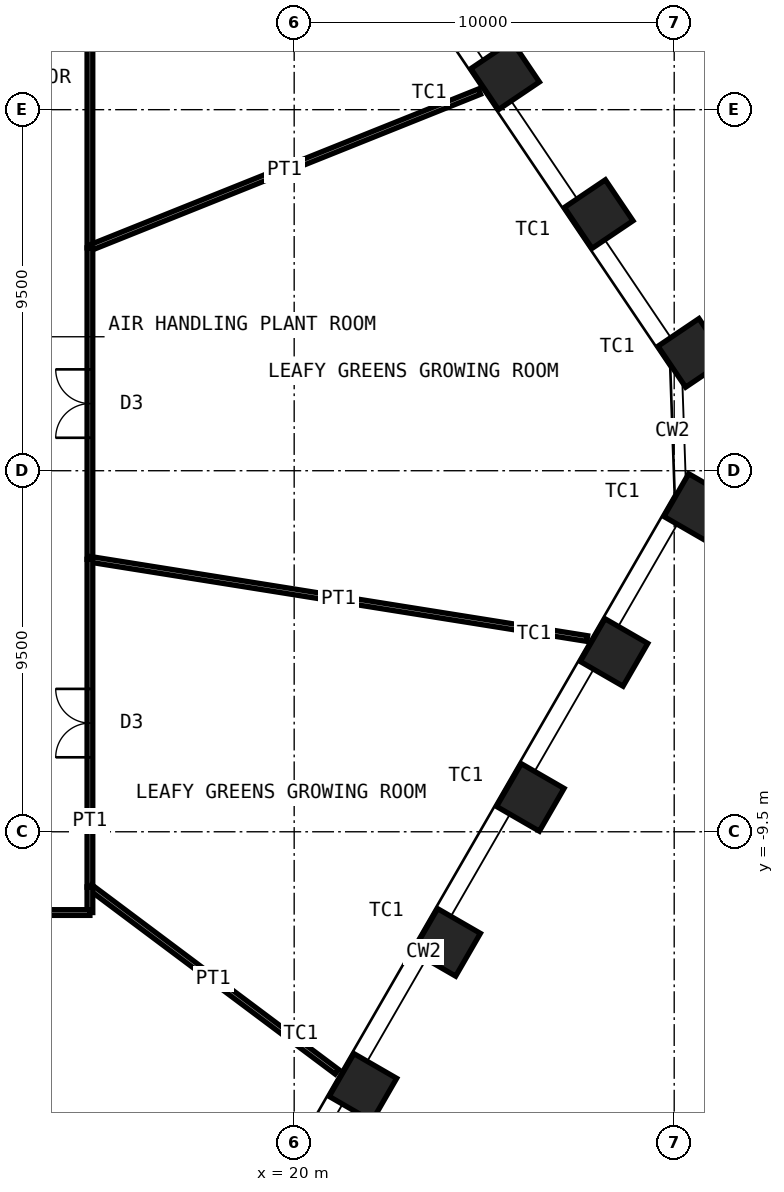
"""IFC4 building model, lengths in metres.
Left out: names, types, materials, properties, quantities, classifications, styles, units other than length and angle.
Written with IfcOpenShell. Run it as: python <this file> out.ifc"""

import sys

from ifc_helpers import new_model, si_unit, direction, frame, frame_2d, origin, origin_2d, place, context, subcontext, project, spatial, rectangle, hollow_rectangle, extrude, element, fill, save


model = new_model("IFC4")
c1 = context("Model", 3, precision=1e-05, world=origin(), true_north=direction((0.0, 1.0)))
c2 = subcontext(c1, "Body", "Model", "MODEL_VIEW")
j1 = project(units=[si_unit("LENGTHUNIT", "METRE"), si_unit("PLANEANGLEUNIT", "RADIAN")], contexts=[c1])
p1 = place(None, origin())
s1 = spatial("IfcSite", under=j1, at=p1, CompositionType="ELEMENT")
p2 = place(p1, origin())
s2 = spatial("IfcBuilding", under=s1, at=p2, CompositionType="ELEMENT")
p3 = place(p2, frame((0.0, 0.0, 47.0)))
s3 = spatial("IfcBuildingStorey", under=s2, at=p3, CompositionType="ELEMENT", Elevation=47.0)
for number, where, z_axis, x_axis in (
    (1, (25.55, 10.404, 0.0), (0.0, 0.0, 1.0), (-0.559, 0.829, 0.0)),
    (2, (28.013, 6.752, 0.0), (0.0, 0.0, 1.0), (-0.559, 0.829, 0.0)),
    (3, (30.476, 3.101, 0.0), (0.0, 0.0, 1.0), (-0.559, 0.829, 0.0)),
    (4, (30.618, -0.967, 0.0), (0.0, 0.0, 1.0), (0.5, 0.866, 0.0)),
    (5, (28.416, -4.782, 0.0), (0.0, 0.0, 1.0), (0.5, 0.866, 0.0)),
    (6, (26.214, -8.596, 0.0), (0.0, 0.0, 1.0), (0.5, 0.866, 0.0)),
    (7, (24.011, -12.411, 0.0), (0.0, 0.0, 1.0), (0.5, 0.866, 0.0)),
    (8, (21.809, -16.225, 0.0), (0.0, 0.0, 1.0), (0.5, 0.866, 0.0)),
):
    element("IfcColumn", number, at=place(p3, frame(where, z_axis=z_axis, x_axis=x_axis)), inside=s3, PredefinedType="COLUMN", context=c2, shape_type="SweptSolid", body=[
        extrude(hollow_rectangle(XDim=1.3, YDim=1.3, WallThickness=0.1, at=origin_2d()), origin(), (0.0, 0.0, 1.0), 5.0),
    ])
p4 = place(p3, frame((14.625, 11.625, 0.0), z_axis=(0.0, 0.0, 1.0), x_axis=(0.0, -1.0, 0.0)))
e9 = element("IfcWall", 9, at=p4, inside=s3, PredefinedType="PARTITIONING", context=c2, shape_type="SweptSolid", body=[
    extrude(rectangle(XDim=5.761, YDim=0.15, at=frame_2d((2.88, 0.0))), origin(), (0.0, 0.0, 1.0), 4.8),
])
p5 = place(p3, frame((24.877, 9.975, 0.0), z_axis=(0.0, 0.0, 1.0), x_axis=(-0.928157765849, -0.372186998288, 0.0)))
e10 = element("IfcWall", 10, at=p5, inside=s3, PredefinedType="PARTITIONING", context=c2, shape_type="SweptSolid", body=[
    extrude(rectangle(XDim=11.046, YDim=0.15, at=frame_2d((5.523, 0.0))), origin(), (0.0, 0.0, 1.0), 3.7),
])
p6 = place(p3, frame((14.625, 5.864, 0.0), z_axis=(0.0, 0.0, 1.0), x_axis=(0.0, -1.0, 0.0)))
e11 = element("IfcWall", 11, at=p6, inside=s3, PredefinedType="PARTITIONING", context=c2, shape_type="SweptSolid", body=[
    extrude(rectangle(XDim=8.195, YDim=0.15, at=frame_2d((4.097, 0.0))), origin(), (0.0, 0.0, 1.0), 4.8),
])
p7 = place(p6, frame((3.198, 0.0, 0.0)))
e12 = element("IfcOpeningElement", 12, at=p7, cuts=e11, PredefinedType="OPENING", context=c2, shape_type="SweptSolid", body=[
    extrude(rectangle(XDim=1.8, YDim=2.4, at=frame_2d((0.9, 1.2))), frame((0.0, 0.085, 0.0), z_axis=(0.0, -1.0, 0.0), x_axis=(1.0, 0.0, 0.0)), (0.0, 0.0, 1.0), 0.17),
])
p8 = place(p3, frame((27.711, -4.416, 0.0), z_axis=(0.0, 0.0, 1.0), x_axis=(-0.987538625309, 0.15737682016, 0.0)))
e13 = element("IfcWall", 13, at=p8, inside=s3, PredefinedType="PARTITIONING", context=c2, shape_type="SweptSolid", body=[
    extrude(rectangle(XDim=13.251, YDim=0.15, at=frame_2d((6.625, 0.0))), origin(), (0.0, 0.0, 1.0), 3.7),
])
p9 = place(p3, frame((14.625, -2.331, 0.0), z_axis=(0.0, 0.0, 1.0), x_axis=(0.0, -1.0, 0.0)))
e14 = element("IfcWall", 14, at=p9, inside=s3, PredefinedType="PARTITIONING", context=c2, shape_type="SweptSolid", body=[
    extrude(rectangle(XDim=8.62, YDim=0.15, at=frame_2d((4.31, 0.0))), origin(), (0.0, 0.0, 1.0), 4.8),
])
p10 = place(p9, frame((3.41, 0.0, 0.0)))
e15 = element("IfcOpeningElement", 15, at=p10, cuts=e14, PredefinedType="OPENING", context=c2, shape_type="SweptSolid", body=[
    extrude(rectangle(XDim=1.8, YDim=2.4, at=frame_2d((0.9, 1.2))), frame((0.0, 0.085, 0.0), z_axis=(0.0, -1.0, 0.0), x_axis=(1.0, 0.0, 0.0)), (0.0, 0.0, 1.0), 0.17),
])
p11 = place(p3, frame((21.123, -15.815, 0.0), z_axis=(0.0, 0.0, 1.0), x_axis=(-0.800490565123, 0.599345355492, 0.0)))
e16 = element("IfcWall", 16, at=p11, inside=s3, PredefinedType="PARTITIONING", context=c2, shape_type="SweptSolid", body=[
    extrude(rectangle(XDim=8.118, YDim=0.15, at=frame_2d((4.059, 0.0))), origin(), (0.0, 0.0, 1.0), 3.7),
])
p12 = place(p3, frame((14.625, -10.95, 0.0), z_axis=(0.0, 0.0, 1.0), x_axis=(0.0, -1.0, 0.0)))
e17 = element("IfcWall", 17, at=p12, inside=s3, PredefinedType="PARTITIONING", context=c2, shape_type="SweptSolid", body=[
    extrude(rectangle(XDim=0.675, YDim=0.15, at=frame_2d((0.337, 0.0))), origin(), (0.0, 0.0, 1.0), 4.8),
])
p13 = place(p3, frame((14.625, -11.625, 0.0), z_axis=(0.0, 0.0, 1.0), x_axis=(-1.0, 0.0, 0.0)))
e18 = element("IfcWall", 18, at=p13, inside=s3, PredefinedType="PARTITIONING", context=c2, shape_type="SweptSolid", body=[
    extrude(rectangle(XDim=16.29, YDim=0.15, at=frame_2d((8.145, 0.0))), origin(), (0.0, 0.0, 1.0), 4.8),
])
p14 = place(p13, frame((7.245, 0.0, 0.0)))
e19 = element("IfcOpeningElement", 19, at=p14, cuts=e18, PredefinedType="OPENING", context=c2, shape_type="SweptSolid", body=[
    extrude(rectangle(XDim=1.8, YDim=2.4, at=frame_2d((0.9, 1.2))), frame((0.0, 0.085, 0.0), z_axis=(0.0, -1.0, 0.0), x_axis=(1.0, 0.0, 0.0)), (0.0, 0.0, 1.0), 0.17),
])
p15 = place(p7, origin())
e20 = element("IfcDoor", 20, at=p15, inside=s3, OperationType="DOUBLE_DOOR_DOUBLE_SWING", PredefinedType="DOOR", context=c2, shape_type="SweptSolid", body=[
    extrude(rectangle(XDim=1.8, YDim=2.4, at=frame_2d((0.9, 1.2))), frame((0.0, 0.025, 0.0), z_axis=(0.0, -1.0, 0.0), x_axis=(1.0, 0.0, 0.0)), (0.0, 0.0, 1.0), 0.05),
])
fill(e12, e20)
p16 = place(p10, origin())
e21 = element("IfcDoor", 21, at=p16, inside=s3, OperationType="DOUBLE_DOOR_DOUBLE_SWING", PredefinedType="DOOR", context=c2, shape_type="SweptSolid", body=[
    extrude(rectangle(XDim=1.8, YDim=2.4, at=frame_2d((0.9, 1.2))), frame((0.0, 0.025, 0.0), z_axis=(0.0, -1.0, 0.0), x_axis=(1.0, 0.0, 0.0)), (0.0, 0.0, 1.0), 0.05),
])
fill(e15, e21)
save(model, sys.argv[1])
